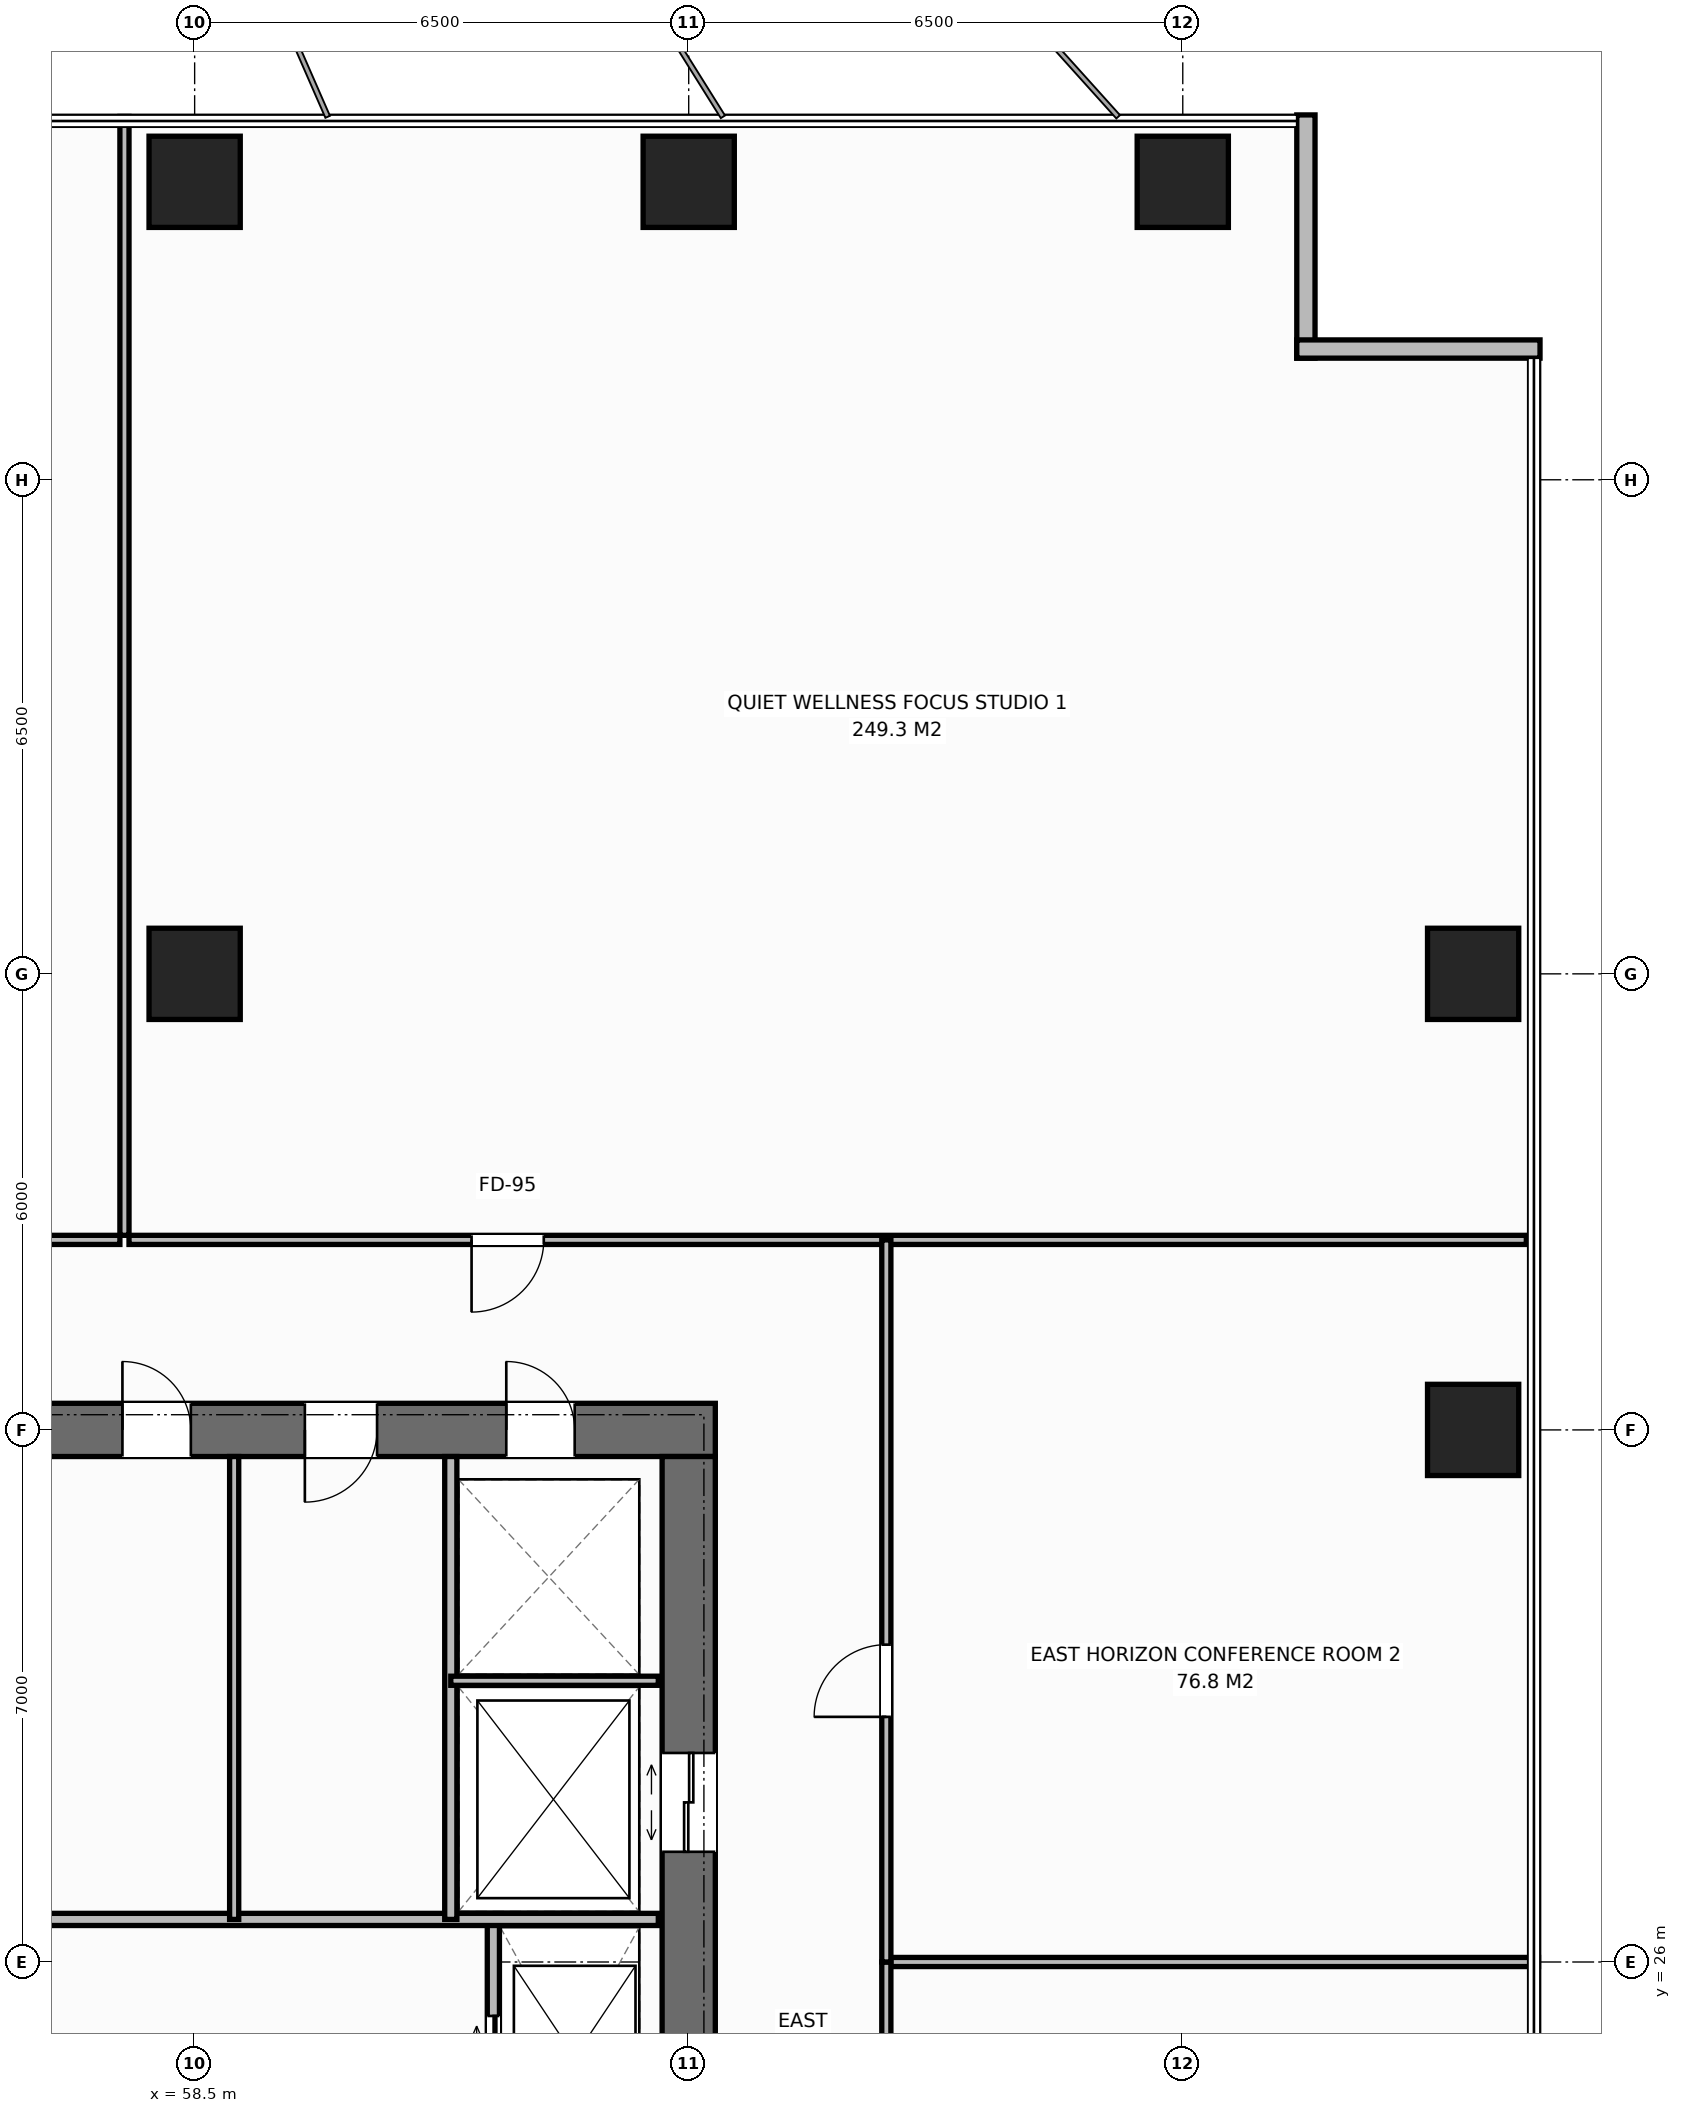
"""IFC4 building model, lengths in metres.
Left out: names, types, materials, properties, quantities, classifications, styles, units other than length and angle.
Written with IfcOpenShell. Run it as: python <this file> out.ifc"""

import sys

from ifc_helpers import new_model, si_unit, direction, frame, frame_2d, origin, origin_2d, place, context, subcontext, project, spatial, rectangle, extrude, element, fill, save


model = new_model("IFC4")
c1 = context("Model", 3, precision=1e-05, world=origin(), true_north=direction((0.0, 1.0)))
c2 = subcontext(c1, "Body", "Model", "MODEL_VIEW")
j1 = project(units=[si_unit("LENGTHUNIT", "METRE"), si_unit("PLANEANGLEUNIT", "RADIAN")], contexts=[c1])
p1 = place(None, origin())
s1 = spatial("IfcSite", under=j1, at=p1, CompositionType="ELEMENT")
p2 = place(p1, origin())
s2 = spatial("IfcBuilding", under=s1, at=p2, CompositionType="ELEMENT")
p3 = place(p2, frame((0.0, 0.0, 93.6)))
s3 = spatial("IfcBuildingStorey", under=s2, at=p3, CompositionType="ELEMENT", Elevation=93.6)
p4 = place(p3, frame((51.65, 33.0, 0.0), z_axis=(0.0, 0.0, 1.0), x_axis=(1.0, 0.0, 0.0)))
e1 = element("IfcWall", 1, at=p4, inside=s3, PredefinedType="SHEAR", context=c2, shape_type="SweptSolid", body=[
    extrude(rectangle(XDim=13.7, YDim=0.7, at=frame_2d((6.85, 0.0))), origin(), (0.0, 0.0, 1.0), 3.8),
])
p5 = place(p4, frame((3.07, 0.0, 0.0)))
e2 = element("IfcOpeningElement", 2, at=p5, cuts=e1, PredefinedType="OPENING", context=c2, shape_type="SweptSolid", body=[
    extrude(rectangle(XDim=1.4, YDim=2.2, at=frame_2d((0.7, 1.1))), frame((0.0, 0.36, 0.0), z_axis=(0.0, -1.0, 0.0), x_axis=(1.0, 0.0, 0.0)), (0.0, 0.0, 1.0), 0.72),
])
p6 = place(p4, frame((10.95, 0.0, 0.0)))
e3 = element("IfcOpeningElement", 3, at=p6, cuts=e1, PredefinedType="OPENING", context=c2, shape_type="SweptSolid", body=[
    extrude(rectangle(XDim=0.9, YDim=2.15, at=frame_2d((0.45, 1.075))), frame((0.0, 0.36, 0.0), z_axis=(0.0, -1.0, 0.0), x_axis=(1.0, 0.0, 0.0)), (0.0, 0.0, 1.0), 0.72),
])
p7 = place(p4, frame((5.9, 0.0, 0.0)))
e4 = element("IfcOpeningElement", 4, at=p7, cuts=e1, PredefinedType="OPENING", context=c2, shape_type="SweptSolid", body=[
    extrude(rectangle(XDim=0.9, YDim=2.15, at=frame_2d((0.45, 1.075))), frame((0.0, 0.36, 0.0), z_axis=(0.0, -1.0, 0.0), x_axis=(1.0, 0.0, 0.0)), (0.0, 0.0, 1.0), 0.72),
])
p8 = place(p4, frame((8.3, 0.0, 0.0)))
e5 = element("IfcOpeningElement", 5, at=p8, cuts=e1, PredefinedType="OPENING", context=c2, shape_type="SweptSolid", body=[
    extrude(rectangle(XDim=0.95, YDim=2.15, at=frame_2d((0.475, 1.075))), frame((0.0, 0.36, 0.0), z_axis=(0.0, -1.0, 0.0), x_axis=(1.0, 0.0, 0.0)), (0.0, 0.0, 1.0), 0.72),
])
p9 = place(p3, frame((65.0, 19.35, 0.0), z_axis=(0.0, 0.0, 1.0), x_axis=(0.0, 1.0, 0.0)))
e6 = element("IfcWall", 6, at=p9, inside=s3, PredefinedType="SHEAR", context=c2, shape_type="SweptSolid", body=[
    extrude(rectangle(XDim=13.3, YDim=0.7, at=frame_2d((6.65, 0.0))), origin(), (0.0, 0.0, 1.0), 3.8),
])
p10 = place(p9, frame((8.1, 0.0, 0.0)))
e7 = element("IfcOpeningElement", 7, at=p10, cuts=e6, PredefinedType="OPENING", context=c2, shape_type="SweptSolid", body=[
    extrude(rectangle(XDim=1.3, YDim=2.2, at=frame_2d((0.65, 1.1))), frame((0.0, 0.36, 0.0), z_axis=(0.0, -1.0, 0.0), x_axis=(1.0, 0.0, 0.0)), (0.0, 0.0, 1.0), 0.72),
])
for number, where, z_axis, x_axis in (
    (8, (58.5, 39.0, 0.0), (0.0, 0.0, 1.0), (1.0, 0.0, 0.0)),
    (9, (58.5, 49.42, 0.0), (0.0, 0.0, 1.0), (1.0, 0.0, 0.0)),
    (10, (65.0, 49.42, 0.0), (0.0, 0.0, 1.0), (1.0, 0.0, 0.0)),
    (11, (71.5, 49.42, 0.0), (0.0, 0.0, 1.0), (1.0, 0.0, 0.0)),
    (12, (75.32, 33.0, 0.0), (0.0, 0.0, 1.0), (1.0, 0.0, 0.0)),
    (13, (75.32, 39.0, 0.0), (0.0, 0.0, 1.0), (1.0, 0.0, 0.0)),
):
    element("IfcColumn", number, at=place(p3, frame(where, z_axis=z_axis, x_axis=x_axis)), inside=s3, PredefinedType="COLUMN", context=c2, shape_type="SweptSolid", body=[
        extrude(rectangle(XDim=1.2, YDim=1.2, at=origin_2d()), origin(), (0.0, 0.0, 1.0), 3.8),
    ])
for number, where, z_axis, x_axis in (
    (14, (73.12, 50.3, 0.0), (0.0, 0.0, 1.0), (0.0, -1.0, 0.0)),
    (15, (73.0, 47.22, 0.0), (0.0, 0.0, 1.0), (1.0, 0.0, 0.0)),
):
    element("IfcWall", number, at=place(p3, frame(where, z_axis=z_axis, x_axis=x_axis)), inside=s3, PredefinedType="STANDARD", context=c2, shape_type="SweptSolid", body=[
        extrude(rectangle(XDim=3.2, YDim=0.24, at=frame_2d((1.6, 0.0))), origin(), (0.0, 0.0, 1.0), 3.565),
    ])
p11 = place(p3, frame((62.43, 23.09, 0.0), z_axis=(0.0, 0.0, 1.0), x_axis=(0.0, 1.0, 0.0)))
e16 = element("IfcWall", 16, at=p11, inside=s3, PredefinedType="STANDARD", context=c2, shape_type="SweptSolid", body=[
    extrude(rectangle(XDim=3.47, YDim=0.16, at=frame_2d((1.735, 0.0))), origin(), (0.0, 0.0, 1.0), 3.565),
])
p12 = place(p11, frame((1.1, 0.0, 0.0)))
e17 = element("IfcOpeningElement", 17, at=p12, cuts=e16, PredefinedType="OPENING", context=c2, shape_type="SweptSolid", body=[
    extrude(rectangle(XDim=1.1, YDim=2.2, at=frame_2d((0.55, 1.1))), frame((0.0, 0.09, 0.0), z_axis=(0.0, -1.0, 0.0), x_axis=(1.0, 0.0, 0.0)), (0.0, 0.0, 1.0), 0.18),
])
p13 = place(p3, frame((56.26, 26.56, 0.0), z_axis=(0.0, 0.0, 1.0), x_axis=(1.0, 0.0, 0.0)))
e18 = element("IfcWall", 18, at=p13, inside=s3, PredefinedType="STANDARD", context=c2, shape_type="SweptSolid", body=[
    extrude(rectangle(XDim=8.34, YDim=0.16, at=frame_2d((4.17, 0.0))), origin(), (0.0, 0.0, 1.0), 3.565),
])
p14 = place(p3, frame((61.87, 26.56, 0.0), z_axis=(0.0, 0.0, 1.0), x_axis=(0.0, 1.0, 0.0)))
e19 = element("IfcWall", 19, at=p14, inside=s3, PredefinedType="STANDARD", context=c2, shape_type="SweptSolid", body=[
    extrude(rectangle(XDim=6.09, YDim=0.16, at=frame_2d((3.045, 0.0))), origin(), (0.0, 0.0, 1.0), 3.565),
])
p15 = place(p3, frame((61.87, 29.7, 0.0), z_axis=(0.0, 0.0, 1.0), x_axis=(1.0, 0.0, 0.0)))
e20 = element("IfcWall", 20, at=p15, inside=s3, PredefinedType="PARTITIONING", context=c2, shape_type="SweptSolid", body=[
    extrude(rectangle(XDim=2.73, YDim=0.12, at=frame_2d((1.365, 0.0))), origin(), (0.0, 0.0, 1.0), 3.565),
])
p16 = place(p3, frame((59.02, 26.56, 0.0), z_axis=(0.0, 0.0, 1.0), x_axis=(0.0, 1.0, 0.0)))
e21 = element("IfcWall", 21, at=p16, inside=s3, PredefinedType="PARTITIONING", context=c2, shape_type="SweptSolid", body=[
    extrude(rectangle(XDim=6.09, YDim=0.12, at=frame_2d((3.045, 0.0))), origin(), (0.0, 0.0, 1.0), 3.565),
])
p17 = place(p3, frame((57.577, 35.56, 0.0), z_axis=(0.0, 0.0, 1.0), x_axis=(0.0, 1.0, 0.0)))
e22 = element("IfcWall", 22, at=p17, inside=s3, PredefinedType="PARTITIONING", context=c2, shape_type="SweptSolid", body=[
    extrude(rectangle(XDim=14.72, YDim=0.12, at=frame_2d((7.36, 0.0))), origin(), (0.0, 0.0, 1.0), 3.565),
])
p18 = place(p3, frame((35.647, 35.5, 0.0), z_axis=(0.0, 0.0, 1.0), x_axis=(1.0, 0.0, 0.0)))
e23 = element("IfcWall", 23, at=p18, inside=s3, PredefinedType="PARTITIONING", context=c2, shape_type="SweptSolid", body=[
    extrude(rectangle(XDim=21.87, YDim=0.12, at=frame_2d((10.935, 0.0))), origin(), (0.0, 0.0, 1.0), 3.565),
])
p19 = place(p18, frame((0.48, 0.0, 0.0)))
e24 = element("IfcOpeningElement", 24, at=p19, cuts=e23, PredefinedType="OPENING", context=c2, shape_type="SweptSolid", body=[
    extrude(rectangle(XDim=0.95, YDim=2.15, at=frame_2d((0.475, 1.075))), frame((0.0, 0.07, 0.0), z_axis=(0.0, -1.0, 0.0), x_axis=(1.0, 0.0, 0.0)), (0.0, 0.0, 1.0), 0.14),
])
p20 = place(p3, frame((57.637, 35.5, 0.0), z_axis=(0.0, 0.0, 1.0), x_axis=(1.0, 0.0, 0.0)))
e25 = element("IfcWall", 25, at=p20, inside=s3, PredefinedType="PARTITIONING", context=c2, shape_type="SweptSolid", body=[
    extrude(rectangle(XDim=18.383, YDim=0.12, at=frame_2d((9.192, 0.0))), origin(), (0.0, 0.0, 1.0), 3.565),
])
p21 = place(p20, frame((4.507, 0.0, 0.0)))
e26 = element("IfcOpeningElement", 26, at=p21, cuts=e25, PredefinedType="OPENING", context=c2, shape_type="SweptSolid", body=[
    extrude(rectangle(XDim=0.95, YDim=2.15, at=frame_2d((0.475, 1.075))), frame((0.0, 0.07, 0.0), z_axis=(0.0, -1.0, 0.0), x_axis=(1.0, 0.0, 0.0)), (0.0, 0.0, 1.0), 0.14),
])
p22 = place(p3, frame((67.6, 26.0, 0.0), z_axis=(0.0, 0.0, 1.0), x_axis=(1.0, 0.0, 0.0)))
e27 = element("IfcWall", 27, at=p22, inside=s3, PredefinedType="PARTITIONING", context=c2, shape_type="SweptSolid", body=[
    extrude(rectangle(XDim=8.58, YDim=0.12, at=frame_2d((4.29, 0.0))), origin(), (0.0, 0.0, 1.0), 3.565),
])
p23 = place(p3, frame((67.6, 16.5, 0.0), z_axis=(0.0, 0.0, 1.0), x_axis=(0.0, 1.0, 0.0)))
e28 = element("IfcWall", 28, at=p23, inside=s3, PredefinedType="PARTITIONING", context=c2, shape_type="SweptSolid", body=[
    extrude(rectangle(XDim=9.5, YDim=0.12, at=frame_2d((4.75, 0.0))), origin(), (0.0, 0.0, 1.0), 3.565),
])
p24 = place(p23, frame((5.325, 0.0, 0.0)))
e29 = element("IfcOpeningElement", 29, at=p24, cuts=e28, PredefinedType="OPENING", context=c2, shape_type="SweptSolid", body=[
    extrude(rectangle(XDim=0.95, YDim=2.15, at=frame_2d((0.475, 1.075))), frame((0.0, 0.07, 0.0), z_axis=(0.0, -1.0, 0.0), x_axis=(1.0, 0.0, 0.0)), (0.0, 0.0, 1.0), 0.14),
])
p25 = place(p3, frame((67.6, 26.0, 0.0), z_axis=(0.0, 0.0, 1.0), x_axis=(0.0, 1.0, 0.0)))
e30 = element("IfcWall", 30, at=p25, inside=s3, PredefinedType="PARTITIONING", context=c2, shape_type="SweptSolid", body=[
    extrude(rectangle(XDim=9.5, YDim=0.12, at=frame_2d((4.75, 0.0))), origin(), (0.0, 0.0, 1.0), 3.565),
])
p26 = place(p25, frame((3.225, 0.0, 0.0)))
e31 = element("IfcOpeningElement", 31, at=p26, cuts=e30, PredefinedType="OPENING", context=c2, shape_type="SweptSolid", body=[
    extrude(rectangle(XDim=0.95, YDim=2.15, at=frame_2d((0.475, 1.075))), frame((0.0, 0.07, 0.0), z_axis=(0.0, -1.0, 0.0), x_axis=(1.0, 0.0, 0.0)), (0.0, 0.0, 1.0), 0.14),
])
p27 = place(p12, origin())
e32 = element("IfcDoor", 32, at=p27, inside=s3, OperationType="DOUBLE_DOOR_SLIDING", PredefinedType="DOOR", context=c2, shape_type="SweptSolid", body=[
    extrude(rectangle(XDim=1.1, YDim=2.2, at=frame_2d((0.55, 1.1))), frame((0.0, 0.025, 0.0), z_axis=(0.0, -1.0, 0.0), x_axis=(1.0, 0.0, 0.0)), (0.0, 0.0, 1.0), 0.05),
])
fill(e17, e32)
p28 = place(p10, origin())
e33 = element("IfcDoor", 33, at=p28, inside=s3, OperationType="DOUBLE_DOOR_SLIDING", PredefinedType="DOOR", context=c2, shape_type="SweptSolid", body=[
    extrude(rectangle(XDim=1.3, YDim=2.2, at=frame_2d((0.65, 1.1))), frame((0.0, 0.025, 0.0), z_axis=(0.0, -1.0, 0.0), x_axis=(1.0, 0.0, 0.0)), (0.0, 0.0, 1.0), 0.05),
])
fill(e7, e33)
p29 = place(p6, origin())
e34 = element("IfcDoor", 34, at=p29, inside=s3, OperationType="SINGLE_SWING_LEFT", PredefinedType="DOOR", context=c2, shape_type="SweptSolid", body=[
    extrude(rectangle(XDim=0.9, YDim=2.15, at=frame_2d((0.45, 1.075))), frame((0.0, -0.075, 0.0), z_axis=(0.0, -1.0, 0.0), x_axis=(1.0, 0.0, 0.0)), (0.0, 0.0, 1.0), 0.05),
])
fill(e3, e34)
p30 = place(p7, origin())
e35 = element("IfcDoor", 35, at=p30, inside=s3, OperationType="SINGLE_SWING_LEFT", PredefinedType="DOOR", context=c2, shape_type="SweptSolid", body=[
    extrude(rectangle(XDim=0.9, YDim=2.15, at=frame_2d((0.45, 1.075))), frame((0.0, -0.075, 0.0), z_axis=(0.0, -1.0, 0.0), x_axis=(1.0, 0.0, 0.0)), (0.0, 0.0, 1.0), 0.05),
])
fill(e4, e35)
p31 = place(p8, origin())
e36 = element("IfcDoor", 36, at=p31, inside=s3, OperationType="SINGLE_SWING_RIGHT", PredefinedType="DOOR", context=c2, shape_type="SweptSolid", body=[
    extrude(rectangle(XDim=0.95, YDim=2.15, at=frame_2d((0.475, 1.075))), frame((0.0, -0.075, 0.0), z_axis=(0.0, -1.0, 0.0), x_axis=(1.0, 0.0, 0.0)), (0.0, 0.0, 1.0), 0.05),
])
fill(e5, e36)
p32 = place(p21, origin())
e37 = element("IfcDoor", 37, at=p32, inside=s3, OperationType="SINGLE_SWING_RIGHT", PredefinedType="DOOR", context=c2, shape_type="SweptSolid", body=[
    extrude(rectangle(XDim=0.95, YDim=2.15, at=frame_2d((0.475, 1.075))), frame((0.0, 0.025, 0.0), z_axis=(0.0, -1.0, 0.0), x_axis=(1.0, 0.0, 0.0)), (0.0, 0.0, 1.0), 0.05),
])
fill(e26, e37)
p33 = place(p26, origin())
e38 = element("IfcDoor", 38, at=p33, inside=s3, OperationType="SINGLE_SWING_LEFT", PredefinedType="DOOR", context=c2, shape_type="SweptSolid", body=[
    extrude(rectangle(XDim=0.95, YDim=2.15, at=frame_2d((0.475, 1.075))), frame((0.0, 0.025, 0.0), z_axis=(0.0, -1.0, 0.0), x_axis=(1.0, 0.0, 0.0)), (0.0, 0.0, 1.0), 0.05),
])
fill(e31, e38)
save(model, sys.argv[1])
